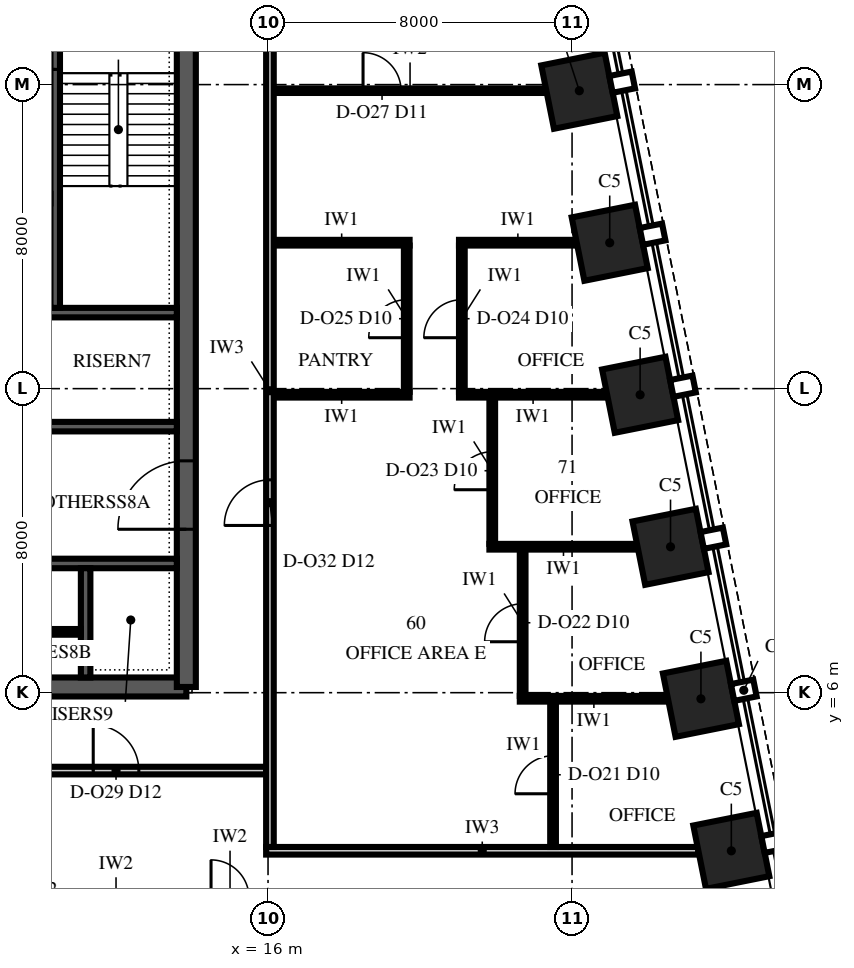
"""IFC4 building model, lengths in metres.
Left out: names, types, materials, properties, quantities, classifications, styles, units other than length and angle.
Written with IfcOpenShell. Run it as: python <this file> out.ifc"""

import sys

from ifc_helpers import new_model, si_unit, direction, frame, frame_2d, origin, origin_2d, place, context, subcontext, project, spatial, polyline, rectangle, outline, extrude, element, fill, save


model = new_model("IFC4")
c1 = context("Model", 3, precision=1e-05, world=origin(), true_north=direction((0.0, 1.0)))
c2 = subcontext(c1, "Body", "Model", "MODEL_VIEW")
j1 = project(units=[si_unit("LENGTHUNIT", "METRE"), si_unit("PLANEANGLEUNIT", "RADIAN")], contexts=[c1])
p1 = place(None, origin())
s1 = spatial("IfcSite", under=j1, at=p1, CompositionType="ELEMENT")
p2 = place(p1, origin())
s2 = spatial("IfcBuilding", under=s1, at=p2, CompositionType="ELEMENT")
p3 = place(p2, frame((0.0, 0.0, 248.0)))
s3 = spatial("IfcBuildingStorey", under=s2, at=p3, CompositionType="ELEMENT", Elevation=248.0)
for number, where, z_axis, x_axis in (
    (1, (28.191, 1.838, 0.0), (0.0, 0.0, 1.0), (-0.196, 0.981, 0.0)),
    (2, (27.391, 5.838, 0.0), (0.0, 0.0, 1.0), (-0.196, 0.981, 0.0)),
    (3, (26.591, 9.838, 0.0), (0.0, 0.0, 1.0), (-0.196, 0.981, 0.0)),
    (4, (25.791, 13.838, 0.0), (0.0, 0.0, 1.0), (-0.196, 0.981, 0.0)),
    (5, (24.991, 17.838, 0.0), (0.0, 0.0, 1.0), (-0.196, 0.981, 0.0)),
    (6, (24.191, 21.838, 0.0), (0.0, 0.0, 1.0), (-0.196, 0.981, 0.0)),
):
    element("IfcColumn", number, at=place(p3, frame(where, z_axis=z_axis, x_axis=x_axis)), inside=s3, PredefinedType="COLUMN", context=c2, shape_type="SweptSolid", body=[
        extrude(rectangle(XDim=1.7, YDim=1.7, at=origin_2d()), origin(), (0.0, 0.0, 1.0), 4.0),
    ])
p4 = place(p3, frame((-13.85, 6.15, 0.0), z_axis=(0.0, 0.0, 1.0), x_axis=(1.0, 0.0, 0.0)))
e7 = element("IfcWall", 7, at=p4, inside=s3, PredefinedType="SHEAR", context=c2, shape_type="SweptSolid", body=[
    extrude(rectangle(XDim=27.7, YDim=0.5, at=frame_2d((13.85, 0.0))), origin(), (0.0, 0.0, 1.0), 4.0),
])
p5 = place(p3, frame((13.85, 6.15, 0.0), z_axis=(0.0, 0.0, 1.0), x_axis=(0.0, 1.0, 0.0)))
e8 = element("IfcWall", 8, at=p5, inside=s3, PredefinedType="SHEAR", context=c2, shape_type="SweptSolid", body=[
    extrude(outline(polyline([(0.0, -0.25), (17.7, -0.25), (17.7, 0.0), (17.45, 0.0), (17.45, 0.25), (0.25, 0.25), (0.25, 0.0), (0.0, 0.0), (0.0, -0.25)])), origin(), (0.0, 0.0, 1.0), 4.0),
])
p6 = place(p5, frame((4.15, 0.0, 0.0)))
e9 = element("IfcOpeningElement", 9, at=p6, cuts=e8, PredefinedType="OPENING", context=c2, shape_type="SweptSolid", body=[
    extrude(rectangle(XDim=1.8, YDim=2.4, at=frame_2d((0.9, 1.2))), frame((0.0, 0.265, 0.0), z_axis=(0.0, -1.0, 0.0), x_axis=(1.0, 0.0, 0.0)), (0.0, 0.0, 1.0), 0.53),
])
p7 = place(p3, frame((-13.6, 9.4, 0.0), z_axis=(0.0, 0.0, 1.0), x_axis=(1.0, 0.0, 0.0)))
e10 = element("IfcWall", 10, at=p7, inside=s3, PredefinedType="SHEAR", context=c2, shape_type="SweptSolid", body=[
    extrude(rectangle(XDim=27.2, YDim=0.25, at=frame_2d((13.6, 0.0))), origin(), (0.0, 0.0, 1.0), 4.0),
])
p8 = place(p7, frame((8.85, 0.0, 0.0)))
e11 = element("IfcOpeningElement", 11, at=p8, cuts=e10, PredefinedType="OPENING", context=c2, shape_type="SweptSolid", body=[
    extrude(rectangle(XDim=1.1, YDim=2.1, at=frame_2d((0.55, 1.05))), frame((0.0, 0.14, 0.0), z_axis=(0.0, -1.0, 0.0), x_axis=(1.0, 0.0, 0.0)), (0.0, 0.0, 1.0), 0.28),
])
p9 = place(p7, frame((11.65, 0.0, 0.0)))
e12 = element("IfcOpeningElement", 12, at=p9, cuts=e10, PredefinedType="OPENING", context=c2, shape_type="SweptSolid", body=[
    extrude(rectangle(XDim=1.1, YDim=2.1, at=frame_2d((0.55, 1.05))), frame((0.0, 0.14, 0.0), z_axis=(0.0, -1.0, 0.0), x_axis=(1.0, 0.0, 0.0)), (0.0, 0.0, 1.0), 0.28),
])
p10 = place(p7, frame((14.45, 0.0, 0.0)))
e13 = element("IfcOpeningElement", 13, at=p10, cuts=e10, PredefinedType="OPENING", context=c2, shape_type="SweptSolid", body=[
    extrude(rectangle(XDim=1.1, YDim=2.1, at=frame_2d((0.55, 1.05))), frame((0.0, 0.14, 0.0), z_axis=(0.0, -1.0, 0.0), x_axis=(1.0, 0.0, 0.0)), (0.0, 0.0, 1.0), 0.28),
])
p11 = place(p7, frame((0.55, 0.0, 0.0)))
e14 = element("IfcOpeningElement", 14, at=p11, cuts=e10, PredefinedType="OPENING", context=c2, shape_type="SweptSolid", body=[
    extrude(rectangle(XDim=0.9, YDim=2.1, at=frame_2d((0.45, 1.05))), frame((0.0, 0.14, 0.0), z_axis=(0.0, -1.0, 0.0), x_axis=(1.0, 0.0, 0.0)), (0.0, 0.0, 1.0), 0.28),
])
p12 = place(p7, frame((3.35, 0.0, 0.0)))
e15 = element("IfcOpeningElement", 15, at=p12, cuts=e10, PredefinedType="OPENING", context=c2, shape_type="SweptSolid", body=[
    extrude(rectangle(XDim=0.9, YDim=2.1, at=frame_2d((0.45, 1.05))), frame((0.0, 0.14, 0.0), z_axis=(0.0, -1.0, 0.0), x_axis=(1.0, 0.0, 0.0)), (0.0, 0.0, 1.0), 0.28),
])
p13 = place(p7, frame((6.15, 0.0, 0.0)))
e16 = element("IfcOpeningElement", 16, at=p13, cuts=e10, PredefinedType="OPENING", context=c2, shape_type="SweptSolid", body=[
    extrude(rectangle(XDim=0.9, YDim=2.1, at=frame_2d((0.45, 1.05))), frame((0.0, 0.14, 0.0), z_axis=(0.0, -1.0, 0.0), x_axis=(1.0, 0.0, 0.0)), (0.0, 0.0, 1.0), 0.28),
])
p14 = place(p7, frame((17.35, 0.0, 0.0)))
e17 = element("IfcOpeningElement", 17, at=p14, cuts=e10, PredefinedType="OPENING", context=c2, shape_type="SweptSolid", body=[
    extrude(rectangle(XDim=0.9, YDim=2.1, at=frame_2d((0.45, 1.05))), frame((0.0, 0.14, 0.0), z_axis=(0.0, -1.0, 0.0), x_axis=(1.0, 0.0, 0.0)), (0.0, 0.0, 1.0), 0.28),
])
p15 = place(p7, frame((20.15, 0.0, 0.0)))
e18 = element("IfcOpeningElement", 18, at=p15, cuts=e10, PredefinedType="OPENING", context=c2, shape_type="SweptSolid", body=[
    extrude(rectangle(XDim=0.9, YDim=2.1, at=frame_2d((0.45, 1.05))), frame((0.0, 0.14, 0.0), z_axis=(0.0, -1.0, 0.0), x_axis=(1.0, 0.0, 0.0)), (0.0, 0.0, 1.0), 0.28),
])
p16 = place(p7, frame((22.95, 0.0, 0.0)))
e19 = element("IfcOpeningElement", 19, at=p16, cuts=e10, PredefinedType="OPENING", context=c2, shape_type="SweptSolid", body=[
    extrude(rectangle(XDim=0.9, YDim=2.1, at=frame_2d((0.45, 1.05))), frame((0.0, 0.14, 0.0), z_axis=(0.0, -1.0, 0.0), x_axis=(1.0, 0.0, 0.0)), (0.0, 0.0, 1.0), 0.28),
])
p17 = place(p3, frame((-13.6, 13.0, 0.0), z_axis=(0.0, 0.0, 1.0), x_axis=(1.0, 0.0, 0.0)))
e20 = element("IfcWall", 20, at=p17, inside=s3, PredefinedType="SHEAR", context=c2, shape_type="SweptSolid", body=[
    extrude(rectangle(XDim=27.2, YDim=0.25, at=frame_2d((13.6, 0.0))), origin(), (0.0, 0.0, 1.0), 4.0),
])
p18 = place(p17, frame((16.75, 0.0, 0.0)))
e21 = element("IfcOpeningElement", 21, at=p18, cuts=e20, PredefinedType="OPENING", context=c2, shape_type="SweptSolid", body=[
    extrude(rectangle(XDim=0.9, YDim=2.1, at=frame_2d((0.45, 1.05))), frame((0.0, 0.14, 0.0), z_axis=(0.0, -1.0, 0.0), x_axis=(1.0, 0.0, 0.0)), (0.0, 0.0, 1.0), 0.28),
])
p19 = place(p17, frame((21.15, 0.0, 0.0)))
e22 = element("IfcOpeningElement", 22, at=p19, cuts=e20, PredefinedType="OPENING", context=c2, shape_type="SweptSolid", body=[
    extrude(rectangle(XDim=0.9, YDim=2.1, at=frame_2d((0.45, 1.05))), frame((0.0, 0.14, 0.0), z_axis=(0.0, -1.0, 0.0), x_axis=(1.0, 0.0, 0.0)), (0.0, 0.0, 1.0), 0.28),
])
p20 = place(p17, frame((0.55, 0.0, 0.0)))
e23 = element("IfcOpeningElement", 23, at=p20, cuts=e20, PredefinedType="OPENING", context=c2, shape_type="SweptSolid", body=[
    extrude(rectangle(XDim=0.9, YDim=2.1, at=frame_2d((0.45, 1.05))), frame((0.0, 0.14, 0.0), z_axis=(0.0, -1.0, 0.0), x_axis=(1.0, 0.0, 0.0)), (0.0, 0.0, 1.0), 0.28),
])
p21 = place(p17, frame((3.35, 0.0, 0.0)))
e24 = element("IfcOpeningElement", 24, at=p21, cuts=e20, PredefinedType="OPENING", context=c2, shape_type="SweptSolid", body=[
    extrude(rectangle(XDim=0.9, YDim=2.1, at=frame_2d((0.45, 1.05))), frame((0.0, 0.14, 0.0), z_axis=(0.0, -1.0, 0.0), x_axis=(1.0, 0.0, 0.0)), (0.0, 0.0, 1.0), 0.28),
])
p22 = place(p17, frame((6.15, 0.0, 0.0)))
e25 = element("IfcOpeningElement", 25, at=p22, cuts=e20, PredefinedType="OPENING", context=c2, shape_type="SweptSolid", body=[
    extrude(rectangle(XDim=0.9, YDim=2.1, at=frame_2d((0.45, 1.05))), frame((0.0, 0.14, 0.0), z_axis=(0.0, -1.0, 0.0), x_axis=(1.0, 0.0, 0.0)), (0.0, 0.0, 1.0), 0.28),
])
p23 = place(p3, frame((-13.6, 16.0, 0.0), z_axis=(0.0, 0.0, 1.0), x_axis=(1.0, 0.0, 0.0)))
e26 = element("IfcWall", 26, at=p23, inside=s3, PredefinedType="SHEAR", context=c2, shape_type="SweptSolid", body=[
    extrude(rectangle(XDim=27.2, YDim=0.25, at=frame_2d((13.6, 0.0))), origin(), (0.0, 0.0, 1.0), 4.0),
])
p24 = place(p3, frame((11.2, 6.4, 0.0), z_axis=(0.0, 0.0, 1.0), x_axis=(0.0, 1.0, 0.0)))
e27 = element("IfcWall", 27, at=p24, inside=s3, PredefinedType="SHEAR", context=c2, shape_type="SweptSolid", body=[
    extrude(rectangle(XDim=2.875, YDim=0.25, at=frame_2d((1.438, 0.0))), origin(), (0.0, 0.0, 1.0), 4.0),
])
p25 = place(p3, frame((10.4, 16.125, 0.0), z_axis=(0.0, 0.0, 1.0), x_axis=(0.0, 1.0, 0.0)))
e28 = element("IfcWall", 28, at=p25, inside=s3, PredefinedType="SHEAR", context=c2, shape_type="SweptSolid", body=[
    extrude(rectangle(XDim=7.475, YDim=0.25, at=frame_2d((3.738, 0.0))), origin(), (0.0, 0.0, 1.0), 4.0),
])
p26 = place(p25, frame((6.275, 0.0, 0.0)))
e29 = element("IfcOpeningElement", 29, at=p26, cuts=e28, PredefinedType="OPENING", context=c2, shape_type="SweptSolid", body=[
    extrude(rectangle(XDim=1.0, YDim=2.1, at=frame_2d((0.5, 1.05))), frame((0.0, 0.14, 0.0), z_axis=(0.0, -1.0, 0.0), x_axis=(1.0, 0.0, 0.0)), (0.0, 0.0, 1.0), 0.28),
])
p27 = place(p3, frame((8.525, 7.6, 0.0), z_axis=(0.0, 0.0, 1.0), x_axis=(1.0, 0.0, 0.0)))
e30 = element("IfcWall", 30, at=p27, inside=s3, PredefinedType="PARTITIONING", context=c2, shape_type="SweptSolid", body=[
    extrude(rectangle(XDim=2.55, YDim=0.15, at=frame_2d((1.275, 0.0))), origin(), (0.0, 0.0, 1.0), 3.85),
])
p28 = place(p27, frame((0.825, 0.0, 0.0)))
e31 = element("IfcOpeningElement", 31, at=p28, cuts=e30, PredefinedType="OPENING", context=c2, shape_type="SweptSolid", body=[
    extrude(rectangle(XDim=0.9, YDim=2.1, at=frame_2d((0.45, 1.05))), frame((0.0, 0.09, 0.0), z_axis=(0.0, -1.0, 0.0), x_axis=(1.0, 0.0, 0.0)), (0.0, 0.0, 1.0), 0.18),
])
p29 = place(p3, frame((15.95, 1.84, 0.0), z_axis=(0.0, 0.0, 1.0), x_axis=(1.0, 0.0, 0.0)))
e32 = element("IfcWall", 32, at=p29, inside=s3, PredefinedType="PARTITIONING", context=c2, shape_type="SweptSolid", body=[
    extrude(rectangle(XDim=11.374, YDim=0.2, at=frame_2d((5.687, 0.0))), origin(), (0.0, 0.0, 1.0), 3.23),
])
p30 = place(p3, frame((-15.95, 3.95, 0.0), z_axis=(0.0, 0.0, 1.0), x_axis=(1.0, 0.0, 0.0)))
e33 = element("IfcWall", 33, at=p30, inside=s3, PredefinedType="PARTITIONING", context=c2, shape_type="SweptSolid", body=[
    extrude(rectangle(XDim=31.9, YDim=0.2, at=frame_2d((15.95, 0.0))), origin(), (0.0, 0.0, 1.0), 3.23),
])
p31 = place(p30, frame((3.35, 0.0, 0.0)))
e34 = element("IfcOpeningElement", 34, at=p31, cuts=e33, PredefinedType="OPENING", context=c2, shape_type="SweptSolid", body=[
    extrude(rectangle(XDim=1.2, YDim=2.4, at=frame_2d((0.6, 1.2))), frame((0.0, 0.115, 0.0), z_axis=(0.0, -1.0, 0.0), x_axis=(1.0, 0.0, 0.0)), (0.0, 0.0, 1.0), 0.23),
])
p32 = place(p30, frame((27.35, 0.0, 0.0)))
e35 = element("IfcOpeningElement", 35, at=p32, cuts=e33, PredefinedType="OPENING", context=c2, shape_type="SweptSolid", body=[
    extrude(rectangle(XDim=1.2, YDim=2.4, at=frame_2d((0.6, 1.2))), frame((0.0, 0.115, 0.0), z_axis=(0.0, -1.0, 0.0), x_axis=(1.0, 0.0, 0.0)), (0.0, 0.0, 1.0), 0.23),
])
p33 = place(p30, frame((15.35, 0.0, 0.0)))
e36 = element("IfcOpeningElement", 36, at=p33, cuts=e33, PredefinedType="OPENING", context=c2, shape_type="SweptSolid", body=[
    extrude(rectangle(XDim=1.2, YDim=2.4, at=frame_2d((0.6, 1.2))), frame((0.0, 0.115, 0.0), z_axis=(0.0, -1.0, 0.0), x_axis=(1.0, 0.0, 0.0)), (0.0, 0.0, 1.0), 0.23),
])
p34 = place(p3, frame((22.625, 5.84, 0.0), z_axis=(0.0, 0.0, 1.0), x_axis=(1.0, 0.0, 0.0)))
e37 = element("IfcWall", 37, at=p34, inside=s3, PredefinedType="PARTITIONING", context=c2, shape_type="SweptSolid", body=[
    extrude(rectangle(XDim=3.899, YDim=0.15, at=frame_2d((1.949, 0.0))), origin(), (0.0, 0.0, 1.0), 2.842),
])
p35 = place(p3, frame((21.825, 9.84, 0.0), z_axis=(0.0, 0.0, 1.0), x_axis=(1.0, 0.0, 0.0)))
e38 = element("IfcWall", 38, at=p35, inside=s3, PredefinedType="PARTITIONING", context=c2, shape_type="SweptSolid", body=[
    extrude(rectangle(XDim=3.899, YDim=0.15, at=frame_2d((1.949, 0.0))), origin(), (0.0, 0.0, 1.0), 3.23),
])
p36 = place(p3, frame((16.15, 13.84, 0.0), z_axis=(0.0, 0.0, 1.0), x_axis=(1.0, 0.0, 0.0)))
e39 = element("IfcWall", 39, at=p36, inside=s3, PredefinedType="PARTITIONING", context=c2, shape_type="SweptSolid", body=[
    extrude(rectangle(XDim=3.575, YDim=0.15, at=frame_2d((1.788, 0.0))), origin(), (0.0, 0.0, 1.0), 3.85),
])
p37 = place(p3, frame((21.025, 13.84, 0.0), z_axis=(0.0, 0.0, 1.0), x_axis=(1.0, 0.0, 0.0)))
e40 = element("IfcWall", 40, at=p37, inside=s3, PredefinedType="PARTITIONING", context=c2, shape_type="SweptSolid", body=[
    extrude(rectangle(XDim=3.899, YDim=0.15, at=frame_2d((1.949, 0.0))), origin(), (0.0, 0.0, 1.0), 3.23),
])
p38 = place(p3, frame((16.15, 17.84, 0.0), z_axis=(0.0, 0.0, 1.0), x_axis=(1.0, 0.0, 0.0)))
e41 = element("IfcWall", 41, at=p38, inside=s3, PredefinedType="PARTITIONING", context=c2, shape_type="SweptSolid", body=[
    extrude(rectangle(XDim=3.575, YDim=0.15, at=frame_2d((1.788, 0.0))), origin(), (0.0, 0.0, 1.0), 3.23),
])
p39 = place(p3, frame((21.025, 17.84, 0.0), z_axis=(0.0, 0.0, 1.0), x_axis=(1.0, 0.0, 0.0)))
e42 = element("IfcWall", 42, at=p39, inside=s3, PredefinedType="PARTITIONING", context=c2, shape_type="SweptSolid", body=[
    extrude(rectangle(XDim=3.099, YDim=0.15, at=frame_2d((1.549, 0.0))), origin(), (0.0, 0.0, 1.0), 3.23),
])
p40 = place(p3, frame((16.15, 21.84, 0.0), z_axis=(0.0, 0.0, 1.0), x_axis=(1.0, 0.0, 0.0)))
e43 = element("IfcWall", 43, at=p40, inside=s3, PredefinedType="PARTITIONING", context=c2, shape_type="SweptSolid", body=[
    extrude(rectangle(XDim=7.174, YDim=0.12, at=frame_2d((3.587, 0.0))), origin(), (0.0, 0.0, 1.0), 3.23),
])
p41 = place(p40, frame((2.35, 0.0, 0.0)))
e44 = element("IfcOpeningElement", 44, at=p41, cuts=e43, PredefinedType="OPENING", context=c2, shape_type="SweptSolid", body=[
    extrude(rectangle(XDim=1.0, YDim=2.4, at=frame_2d((0.5, 1.2))), frame((0.0, 0.075, 0.0), z_axis=(0.0, -1.0, 0.0), x_axis=(1.0, 0.0, 0.0)), (0.0, 0.0, 1.0), 0.15),
])
p42 = place(p3, frame((16.05, 1.94, 0.0), z_axis=(0.0, 0.0, 1.0), x_axis=(0.0, 1.0, 0.0)))
e45 = element("IfcWall", 45, at=p42, inside=s3, PredefinedType="PARTITIONING", context=c2, shape_type="SweptSolid", body=[
    extrude(rectangle(XDim=24.01, YDim=0.2, at=frame_2d((12.005, 0.0))), origin(), (0.0, 0.0, 1.0), 2.842),
])
p43 = place(p42, frame((8.46, 0.0, 0.0)))
e46 = element("IfcOpeningElement", 46, at=p43, cuts=e45, PredefinedType="OPENING", context=c2, shape_type="SweptSolid", body=[
    extrude(rectangle(XDim=1.2, YDim=2.4, at=frame_2d((0.6, 1.2))), frame((0.0, 0.115, 0.0), z_axis=(0.0, -1.0, 0.0), x_axis=(1.0, 0.0, 0.0)), (0.0, 0.0, 1.0), 0.23),
])
p44 = place(p3, frame((19.65, 13.915, 0.0), z_axis=(0.0, 0.0, 1.0), x_axis=(0.0, 1.0, 0.0)))
e47 = element("IfcWall", 47, at=p44, inside=s3, PredefinedType="PARTITIONING", context=c2, shape_type="SweptSolid", body=[
    extrude(rectangle(XDim=3.85, YDim=0.15, at=frame_2d((1.925, 0.0))), origin(), (0.0, 0.0, 1.0), 3.23),
])
p45 = place(p44, frame((1.425, 0.0, 0.0)))
e48 = element("IfcOpeningElement", 48, at=p45, cuts=e47, PredefinedType="OPENING", context=c2, shape_type="SweptSolid", body=[
    extrude(rectangle(XDim=1.0, YDim=2.3, at=frame_2d((0.5, 1.15))), frame((0.0, 0.09, 0.0), z_axis=(0.0, -1.0, 0.0), x_axis=(1.0, 0.0, 0.0)), (0.0, 0.0, 1.0), 0.18),
])
p46 = place(p3, frame((21.1, 13.915, 0.0), z_axis=(0.0, 0.0, 1.0), x_axis=(0.0, 1.0, 0.0)))
e49 = element("IfcWall", 49, at=p46, inside=s3, PredefinedType="PARTITIONING", context=c2, shape_type="SweptSolid", body=[
    extrude(rectangle(XDim=3.85, YDim=0.15, at=frame_2d((1.925, 0.0))), origin(), (0.0, 0.0, 1.0), 3.23),
])
p47 = place(p46, frame((1.425, 0.0, 0.0)))
e50 = element("IfcOpeningElement", 50, at=p47, cuts=e49, PredefinedType="OPENING", context=c2, shape_type="SweptSolid", body=[
    extrude(rectangle(XDim=1.0, YDim=2.3, at=frame_2d((0.5, 1.15))), frame((0.0, 0.09, 0.0), z_axis=(0.0, -1.0, 0.0), x_axis=(1.0, 0.0, 0.0)), (0.0, 0.0, 1.0), 0.18),
])
p48 = place(p3, frame((21.9, 9.915, 0.0), z_axis=(0.0, 0.0, 1.0), x_axis=(0.0, 1.0, 0.0)))
e51 = element("IfcWall", 51, at=p48, inside=s3, PredefinedType="PARTITIONING", context=c2, shape_type="SweptSolid", body=[
    extrude(rectangle(XDim=3.85, YDim=0.15, at=frame_2d((1.925, 0.0))), origin(), (0.0, 0.0, 1.0), 3.85),
])
p49 = place(p48, frame((1.425, 0.0, 0.0)))
e52 = element("IfcOpeningElement", 52, at=p49, cuts=e51, PredefinedType="OPENING", context=c2, shape_type="SweptSolid", body=[
    extrude(rectangle(XDim=1.0, YDim=2.3, at=frame_2d((0.5, 1.15))), frame((0.0, 0.09, 0.0), z_axis=(0.0, -1.0, 0.0), x_axis=(1.0, 0.0, 0.0)), (0.0, 0.0, 1.0), 0.18),
])
p50 = place(p3, frame((22.7, 5.915, 0.0), z_axis=(0.0, 0.0, 1.0), x_axis=(0.0, 1.0, 0.0)))
e53 = element("IfcWall", 53, at=p50, inside=s3, PredefinedType="PARTITIONING", context=c2, shape_type="SweptSolid", body=[
    extrude(rectangle(XDim=3.85, YDim=0.15, at=frame_2d((1.925, 0.0))), origin(), (0.0, 0.0, 1.0), 2.842),
])
p51 = place(p50, frame((1.425, 0.0, 0.0)))
e54 = element("IfcOpeningElement", 54, at=p51, cuts=e53, PredefinedType="OPENING", context=c2, shape_type="SweptSolid", body=[
    extrude(rectangle(XDim=1.0, YDim=2.3, at=frame_2d((0.5, 1.15))), frame((0.0, 0.09, 0.0), z_axis=(0.0, -1.0, 0.0), x_axis=(1.0, 0.0, 0.0)), (0.0, 0.0, 1.0), 0.18),
])
p52 = place(p3, frame((23.5, 1.94, 0.0), z_axis=(0.0, 0.0, 1.0), x_axis=(0.0, 1.0, 0.0)))
e55 = element("IfcWall", 55, at=p52, inside=s3, PredefinedType="PARTITIONING", context=c2, shape_type="SweptSolid", body=[
    extrude(rectangle(XDim=3.825, YDim=0.15, at=frame_2d((1.913, 0.0))), origin(), (0.0, 0.0, 1.0), 3.85),
])
p53 = place(p52, frame((1.4, 0.0, 0.0)))
e56 = element("IfcOpeningElement", 56, at=p53, cuts=e55, PredefinedType="OPENING", context=c2, shape_type="SweptSolid", body=[
    extrude(rectangle(XDim=1.0, YDim=2.3, at=frame_2d((0.5, 1.15))), frame((0.0, 0.09, 0.0), z_axis=(0.0, -1.0, 0.0), x_axis=(1.0, 0.0, 0.0)), (0.0, 0.0, 1.0), 0.18),
])
p54 = place(p6, origin())
e57 = element("IfcDoor", 57, at=p54, inside=s3, OperationType="DOUBLE_DOOR_SINGLE_SWING", PredefinedType="DOOR", context=c2, shape_type="SweptSolid", body=[
    extrude(rectangle(XDim=1.8, YDim=2.4, at=frame_2d((0.9, 1.2))), frame((0.0, 0.25, 0.0), z_axis=(0.0, -1.0, 0.0), x_axis=(1.0, 0.0, 0.0)), (0.0, 0.0, 1.0), 0.5),
])
fill(e9, e57)
p55 = place(p26, origin())
e58 = element("IfcDoor", 58, at=p55, inside=s3, OperationType="SINGLE_SWING_LEFT", PredefinedType="DOOR", context=c2, shape_type="SweptSolid", body=[
    extrude(rectangle(XDim=1.0, YDim=2.1, at=frame_2d((0.5, 1.05))), frame((0.0, 0.125, 0.0), z_axis=(0.0, -1.0, 0.0), x_axis=(1.0, 0.0, 0.0)), (0.0, 0.0, 1.0), 0.25),
])
fill(e29, e58)
p56 = place(p53, origin())
e59 = element("IfcDoor", 59, at=p56, inside=s3, OperationType="SINGLE_SWING_LEFT", PredefinedType="DOOR", context=c2, shape_type="SweptSolid", body=[
    extrude(rectangle(XDim=1.0, YDim=2.3, at=frame_2d((0.5, 1.15))), frame((0.0, 0.075, 0.0), z_axis=(0.0, -1.0, 0.0), x_axis=(1.0, 0.0, 0.0)), (0.0, 0.0, 1.0), 0.149),
])
fill(e56, e59)
p57 = place(p51, origin())
e60 = element("IfcDoor", 60, at=p57, inside=s3, OperationType="SINGLE_SWING_LEFT", PredefinedType="DOOR", context=c2, shape_type="SweptSolid", body=[
    extrude(rectangle(XDim=1.0, YDim=2.3, at=frame_2d((0.5, 1.15))), frame((0.0, 0.075, 0.0), z_axis=(0.0, -1.0, 0.0), x_axis=(1.0, 0.0, 0.0)), (0.0, 0.0, 1.0), 0.149),
])
fill(e54, e60)
p58 = place(p49, origin())
e61 = element("IfcDoor", 61, at=p58, inside=s3, OperationType="SINGLE_SWING_LEFT", PredefinedType="DOOR", context=c2, shape_type="SweptSolid", body=[
    extrude(rectangle(XDim=1.0, YDim=2.3, at=frame_2d((0.5, 1.15))), frame((0.0, 0.075, 0.0), z_axis=(0.0, -1.0, 0.0), x_axis=(1.0, 0.0, 0.0)), (0.0, 0.0, 1.0), 0.149),
])
fill(e52, e61)
p59 = place(p47, origin())
e62 = element("IfcDoor", 62, at=p59, inside=s3, OperationType="SINGLE_SWING_LEFT", PredefinedType="DOOR", context=c2, shape_type="SweptSolid", body=[
    extrude(rectangle(XDim=1.0, YDim=2.3, at=frame_2d((0.5, 1.15))), frame((0.0, 0.075, 0.0), z_axis=(0.0, -1.0, 0.0), x_axis=(1.0, 0.0, 0.0)), (0.0, 0.0, 1.0), 0.149),
])
fill(e50, e62)
p60 = place(p45, origin())
e63 = element("IfcDoor", 63, at=p60, inside=s3, OperationType="SINGLE_SWING_LEFT", PredefinedType="DOOR", context=c2, shape_type="SweptSolid", body=[
    extrude(rectangle(XDim=1.0, YDim=2.3, at=frame_2d((0.5, 1.15))), frame((0.0, 0.075, 0.0), z_axis=(0.0, -1.0, 0.0), x_axis=(1.0, 0.0, 0.0)), (0.0, 0.0, 1.0), 0.149),
])
fill(e48, e63)
p61 = place(p41, origin())
e64 = element("IfcDoor", 64, at=p61, inside=s3, OperationType="SINGLE_SWING_RIGHT", PredefinedType="DOOR", context=c2, shape_type="SweptSolid", body=[
    extrude(rectangle(XDim=1.0, YDim=2.4, at=frame_2d((0.5, 1.2))), frame((0.0, 0.06, 0.0), z_axis=(0.0, -1.0, 0.0), x_axis=(1.0, 0.0, 0.0)), (0.0, 0.0, 1.0), 0.12),
])
fill(e44, e64)
p62 = place(p32, origin())
e65 = element("IfcDoor", 65, at=p62, inside=s3, OperationType="SINGLE_SWING_LEFT", PredefinedType="DOOR", context=c2, shape_type="SweptSolid", body=[
    extrude(rectangle(XDim=1.2, YDim=2.4, at=frame_2d((0.6, 1.2))), frame((0.0, 0.1, 0.0), z_axis=(0.0, -1.0, 0.0), x_axis=(1.0, 0.0, 0.0)), (0.0, 0.0, 1.0), 0.199),
])
fill(e35, e65)
p63 = place(p43, origin())
e66 = element("IfcDoor", 66, at=p63, inside=s3, OperationType="SINGLE_SWING_LEFT", PredefinedType="DOOR", context=c2, shape_type="SweptSolid", body=[
    extrude(rectangle(XDim=1.2, YDim=2.4, at=frame_2d((0.6, 1.2))), frame((0.0, 0.1, 0.0), z_axis=(0.0, -1.0, 0.0), x_axis=(1.0, 0.0, 0.0)), (0.0, 0.0, 1.0), 0.199),
])
fill(e46, e66)
save(model, sys.argv[1])
